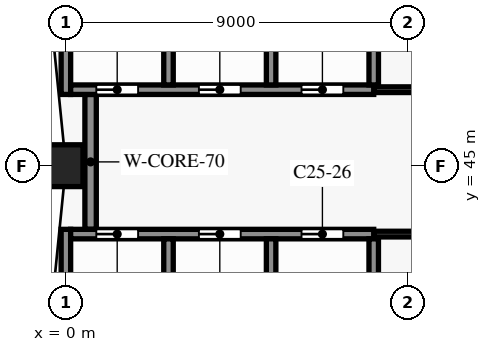
"""IFC4 building model, lengths in metres.
Left out: names, types, materials, properties, quantities, classifications, styles, units other than length and angle.
Written with IfcOpenShell. Run it as: python <this file> out.ifc"""

import sys

from ifc_helpers import new_model, si_unit, direction, frame, frame_2d, origin, origin_2d, place, context, subcontext, project, spatial, rectangle, extrude, element, fill, save


model = new_model("IFC4")
c1 = context("Model", 3, precision=1e-05, world=origin(), true_north=direction((0.0, 1.0)))
c2 = subcontext(c1, "Body", "Model", "MODEL_VIEW")
j1 = project(units=[si_unit("LENGTHUNIT", "METRE"), si_unit("PLANEANGLEUNIT", "RADIAN")], contexts=[c1])
p1 = place(None, origin())
s1 = spatial("IfcSite", under=j1, at=p1, CompositionType="ELEMENT")
p2 = place(p1, origin())
s2 = spatial("IfcBuilding", under=s1, at=p2, CompositionType="ELEMENT")
p3 = place(p2, frame((0.0, 0.0, 185.2)))
s3 = spatial("IfcBuildingStorey", under=s2, at=p3, CompositionType="ELEMENT", Elevation=185.2)
p4 = place(p3, frame((0.0, 45.0, 0.0), z_axis=(0.0, 0.0, 1.0), x_axis=(0.0, -1.0, 0.0)))
e1 = element("IfcColumn", 1, at=p4, inside=s3, PredefinedType="COLUMN", context=c2, shape_type="SweptSolid", body=[
    extrude(rectangle(XDim=0.9, YDim=1.1, at=origin_2d()), origin(), (0.0, 0.0, 1.0), 3.8),
])
p5 = place(p3, frame((8.1, 43.2, 0.0), z_axis=(0.0, 0.0, 1.0), x_axis=(1.0, 0.0, 0.0)))
e2 = element("IfcWall", 2, at=p5, inside=s3, PredefinedType="PARTITIONING", context=c2, shape_type="SweptSolid", body=[
    extrude(rectangle(XDim=16.125, YDim=0.15, at=frame_2d((8.062, 0.0))), origin(), (0.0, 0.0, 1.0), 3.5),
])
p6 = place(p5, frame((1.925, 0.0, 0.0)))
e3 = element("IfcOpeningElement", 3, at=p6, cuts=e2, PredefinedType="OPENING", context=c2, shape_type="SweptSolid", body=[
    extrude(rectangle(XDim=0.9, YDim=2.1, at=frame_2d((0.45, 1.05))), frame((0.0, 0.085, 0.0), z_axis=(0.0, -1.0, 0.0), x_axis=(1.0, 0.0, 0.0)), (0.0, 0.0, 1.0), 0.17),
])
p7 = place(p5, frame((10.025, 0.0, 0.0)))
e4 = element("IfcOpeningElement", 4, at=p7, cuts=e2, PredefinedType="OPENING", context=c2, shape_type="SweptSolid", body=[
    extrude(rectangle(XDim=0.9, YDim=2.1, at=frame_2d((0.45, 1.05))), frame((0.0, 0.085, 0.0), z_axis=(0.0, -1.0, 0.0), x_axis=(1.0, 0.0, 0.0)), (0.0, 0.0, 1.0), 0.17),
])
p8 = place(p3, frame((0.125, 43.2, 0.0), z_axis=(0.0, 0.0, 1.0), x_axis=(1.0, 0.0, 0.0)))
e5 = element("IfcWall", 5, at=p8, inside=s3, PredefinedType="SHEAR", context=c2, shape_type="SweptSolid", body=[
    extrude(rectangle(XDim=7.975, YDim=0.25, at=frame_2d((3.988, 0.0))), origin(), (0.0, 0.0, 1.0), 3.5),
])
p9 = place(p8, frame((0.675, 0.0, 0.0)))
e6 = element("IfcOpeningElement", 6, at=p9, cuts=e5, PredefinedType="OPENING", context=c2, shape_type="SweptSolid", body=[
    extrude(rectangle(XDim=1.1, YDim=2.1, at=frame_2d((0.55, 1.05))), frame((0.0, 0.135, 0.0), z_axis=(0.0, -1.0, 0.0), x_axis=(1.0, 0.0, 0.0)), (0.0, 0.0, 1.0), 0.27),
])
p10 = place(p8, frame((3.375, 0.0, 0.0)))
e7 = element("IfcOpeningElement", 7, at=p10, cuts=e5, PredefinedType="OPENING", context=c2, shape_type="SweptSolid", body=[
    extrude(rectangle(XDim=1.1, YDim=2.1, at=frame_2d((0.55, 1.05))), frame((0.0, 0.135, 0.0), z_axis=(0.0, -1.0, 0.0), x_axis=(1.0, 0.0, 0.0)), (0.0, 0.0, 1.0), 0.27),
])
p11 = place(p8, frame((6.075, 0.0, 0.0)))
e8 = element("IfcOpeningElement", 8, at=p11, cuts=e5, PredefinedType="OPENING", context=c2, shape_type="SweptSolid", body=[
    extrude(rectangle(XDim=1.1, YDim=2.1, at=frame_2d((0.55, 1.05))), frame((0.0, 0.135, 0.0), z_axis=(0.0, -1.0, 0.0), x_axis=(1.0, 0.0, 0.0)), (0.0, 0.0, 1.0), 0.27),
])
p12 = place(p3, frame((8.1, 47.0, 0.0), z_axis=(0.0, 0.0, 1.0), x_axis=(1.0, 0.0, 0.0)))
e9 = element("IfcWall", 9, at=p12, inside=s3, PredefinedType="PARTITIONING", context=c2, shape_type="SweptSolid", body=[
    extrude(rectangle(XDim=13.5, YDim=0.15, at=frame_2d((6.75, 0.0))), origin(), (0.0, 0.0, 1.0), 3.5),
])
p13 = place(p12, frame((1.525, 0.0, 0.0)))
e10 = element("IfcOpeningElement", 10, at=p13, cuts=e9, PredefinedType="OPENING", context=c2, shape_type="SweptSolid", body=[
    extrude(rectangle(XDim=0.9, YDim=2.1, at=frame_2d((0.45, 1.05))), frame((0.0, 0.085, 0.0), z_axis=(0.0, -1.0, 0.0), x_axis=(1.0, 0.0, 0.0)), (0.0, 0.0, 1.0), 0.17),
])
p14 = place(p12, frame((8.275, 0.0, 0.0)))
e11 = element("IfcOpeningElement", 11, at=p14, cuts=e9, PredefinedType="OPENING", context=c2, shape_type="SweptSolid", body=[
    extrude(rectangle(XDim=0.9, YDim=2.1, at=frame_2d((0.45, 1.05))), frame((0.0, 0.085, 0.0), z_axis=(0.0, -1.0, 0.0), x_axis=(1.0, 0.0, 0.0)), (0.0, 0.0, 1.0), 0.17),
])
p15 = place(p3, frame((0.125, 47.0, 0.0), z_axis=(0.0, 0.0, 1.0), x_axis=(1.0, 0.0, 0.0)))
e12 = element("IfcWall", 12, at=p15, inside=s3, PredefinedType="SHEAR", context=c2, shape_type="SweptSolid", body=[
    extrude(rectangle(XDim=7.975, YDim=0.25, at=frame_2d((3.988, 0.0))), origin(), (0.0, 0.0, 1.0), 3.5),
])
p16 = place(p15, frame((0.675, 0.0, 0.0)))
e13 = element("IfcOpeningElement", 13, at=p16, cuts=e12, PredefinedType="OPENING", context=c2, shape_type="SweptSolid", body=[
    extrude(rectangle(XDim=1.1, YDim=2.1, at=frame_2d((0.55, 1.05))), frame((0.0, 0.135, 0.0), z_axis=(0.0, -1.0, 0.0), x_axis=(1.0, 0.0, 0.0)), (0.0, 0.0, 1.0), 0.27),
])
p17 = place(p15, frame((3.375, 0.0, 0.0)))
e14 = element("IfcOpeningElement", 14, at=p17, cuts=e12, PredefinedType="OPENING", context=c2, shape_type="SweptSolid", body=[
    extrude(rectangle(XDim=1.1, YDim=2.1, at=frame_2d((0.55, 1.05))), frame((0.0, 0.135, 0.0), z_axis=(0.0, -1.0, 0.0), x_axis=(1.0, 0.0, 0.0)), (0.0, 0.0, 1.0), 0.27),
])
p18 = place(p15, frame((6.075, 0.0, 0.0)))
e15 = element("IfcOpeningElement", 15, at=p18, cuts=e12, PredefinedType="OPENING", context=c2, shape_type="SweptSolid", body=[
    extrude(rectangle(XDim=1.1, YDim=2.1, at=frame_2d((0.55, 1.05))), frame((0.0, 0.135, 0.0), z_axis=(0.0, -1.0, 0.0), x_axis=(1.0, 0.0, 0.0)), (0.0, 0.0, 1.0), 0.27),
])
p19 = place(p3, frame((0.0, 40.0, 0.0), z_axis=(0.0, 0.0, 1.0), x_axis=(0.0, 1.0, 0.0)))
e16 = element("IfcWall", 16, at=p19, inside=s3, PredefinedType="SHEAR", context=c2, shape_type="SweptSolid", body=[
    extrude(rectangle(XDim=3.325, YDim=0.25, at=frame_2d((1.663, 0.0))), origin(), (0.0, 0.0, 1.0), 3.5),
])
p20 = place(p3, frame((0.0, 46.875, 0.0), z_axis=(0.0, 0.0, 1.0), x_axis=(0.0, 1.0, 0.0)))
e17 = element("IfcWall", 17, at=p20, inside=s3, PredefinedType="SHEAR", context=c2, shape_type="SweptSolid", body=[
    extrude(rectangle(XDim=3.475, YDim=0.25, at=frame_2d((1.738, 0.0))), origin(), (0.0, 0.0, 1.0), 3.5),
])
p21 = place(p3, frame((0.65, 43.325, 0.0), z_axis=(0.0, 0.0, 1.0), x_axis=(0.0, 1.0, 0.0)))
e18 = element("IfcWall", 18, at=p21, inside=s3, PredefinedType="SHEAR", context=c2, shape_type="SweptSolid", body=[
    extrude(rectangle(XDim=3.55, YDim=0.3, at=frame_2d((1.775, 0.0))), origin(), (0.0, 0.0, 1.0), 3.5),
])
for number, where, z_axis, x_axis in (
    (19, (2.7, 40.125, 0.0), (0.0, 0.0, 1.0), (0.0, 1.0, 0.0)),
    (20, (2.7, 47.125, 0.0), (0.0, 0.0, 1.0), (0.0, 1.0, 0.0)),
    (21, (5.4, 40.125, 0.0), (0.0, 0.0, 1.0), (0.0, 1.0, 0.0)),
    (22, (5.4, 47.125, 0.0), (0.0, 0.0, 1.0), (0.0, 1.0, 0.0)),
    (23, (8.1, 40.125, 0.0), (0.0, 0.0, 1.0), (0.0, 1.0, 0.0)),
):
    element("IfcWall", number, at=place(p3, frame(where, z_axis=z_axis, x_axis=x_axis)), inside=s3, PredefinedType="SHEAR", context=c2, shape_type="SweptSolid", body=[
        extrude(rectangle(XDim=2.95, YDim=0.25, at=frame_2d((1.475, 0.0))), origin(), (0.0, 0.0, 1.0), 3.5),
    ])
p22 = place(p3, frame((8.1, 47.125, 0.0), z_axis=(0.0, 0.0, 1.0), x_axis=(0.0, 1.0, 0.0)))
e24 = element("IfcWall", 24, at=p22, inside=s3, PredefinedType="SHEAR", context=c2, shape_type="SweptSolid", body=[
    extrude(rectangle(XDim=3.075, YDim=0.25, at=frame_2d((1.538, 0.0))), origin(), (0.0, 0.0, 1.0), 3.5),
])
p23 = place(p9, origin())
e25 = element("IfcDoor", 25, at=p23, inside=s3, OperationType="DOUBLE_DOOR_SLIDING", PredefinedType="DOOR", context=c2, shape_type="SweptSolid", body=[
    extrude(rectangle(XDim=1.1, YDim=2.1, at=frame_2d((0.55, 1.05))), frame((0.0, 0.025, 0.0), z_axis=(0.0, -1.0, 0.0), x_axis=(1.0, 0.0, 0.0)), (0.0, 0.0, 1.0), 0.05),
])
fill(e6, e25)
p24 = place(p10, origin())
e26 = element("IfcDoor", 26, at=p24, inside=s3, OperationType="DOUBLE_DOOR_SLIDING", PredefinedType="DOOR", context=c2, shape_type="SweptSolid", body=[
    extrude(rectangle(XDim=1.1, YDim=2.1, at=frame_2d((0.55, 1.05))), frame((0.0, 0.025, 0.0), z_axis=(0.0, -1.0, 0.0), x_axis=(1.0, 0.0, 0.0)), (0.0, 0.0, 1.0), 0.05),
])
fill(e7, e26)
p25 = place(p11, origin())
e27 = element("IfcDoor", 27, at=p25, inside=s3, OperationType="DOUBLE_DOOR_SLIDING", PredefinedType="DOOR", context=c2, shape_type="SweptSolid", body=[
    extrude(rectangle(XDim=1.1, YDim=2.1, at=frame_2d((0.55, 1.05))), frame((0.0, 0.025, 0.0), z_axis=(0.0, -1.0, 0.0), x_axis=(1.0, 0.0, 0.0)), (0.0, 0.0, 1.0), 0.05),
])
fill(e8, e27)
p26 = place(p16, origin())
e28 = element("IfcDoor", 28, at=p26, inside=s3, OperationType="DOUBLE_DOOR_SLIDING", PredefinedType="DOOR", context=c2, shape_type="SweptSolid", body=[
    extrude(rectangle(XDim=1.1, YDim=2.1, at=frame_2d((0.55, 1.05))), frame((0.0, 0.025, 0.0), z_axis=(0.0, -1.0, 0.0), x_axis=(1.0, 0.0, 0.0)), (0.0, 0.0, 1.0), 0.05),
])
fill(e13, e28)
p27 = place(p17, origin())
e29 = element("IfcDoor", 29, at=p27, inside=s3, OperationType="DOUBLE_DOOR_SLIDING", PredefinedType="DOOR", context=c2, shape_type="SweptSolid", body=[
    extrude(rectangle(XDim=1.1, YDim=2.1, at=frame_2d((0.55, 1.05))), frame((0.0, 0.025, 0.0), z_axis=(0.0, -1.0, 0.0), x_axis=(1.0, 0.0, 0.0)), (0.0, 0.0, 1.0), 0.05),
])
fill(e14, e29)
p28 = place(p18, origin())
e30 = element("IfcDoor", 30, at=p28, inside=s3, OperationType="DOUBLE_DOOR_SLIDING", PredefinedType="DOOR", context=c2, shape_type="SweptSolid", body=[
    extrude(rectangle(XDim=1.1, YDim=2.1, at=frame_2d((0.55, 1.05))), frame((0.0, 0.025, 0.0), z_axis=(0.0, -1.0, 0.0), x_axis=(1.0, 0.0, 0.0)), (0.0, 0.0, 1.0), 0.05),
])
fill(e15, e30)
save(model, sys.argv[1])
